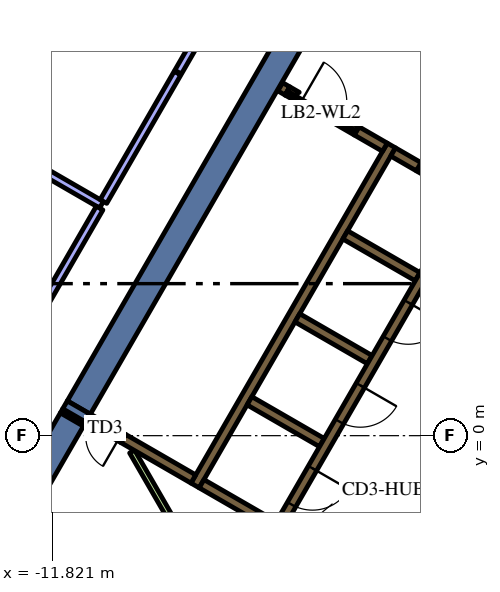
"""IFC4 building model, lengths in metres.
Left out: names, types, materials, properties, quantities, classifications, styles, units other than length and angle.
Written with IfcOpenShell. Run it as: python <this file> out.ifc"""

import sys

from ifc_helpers import new_model, si_unit, direction, frame, frame_2d, origin, place, context, subcontext, project, spatial, polyline, rectangle, outline, extrude, element, fill, save


model = new_model("IFC4")
c1 = context("Model", 3, precision=1e-05, world=origin(), true_north=direction((0.0, 1.0)))
c2 = subcontext(c1, "Body", "Model", "MODEL_VIEW")
j1 = project(units=[si_unit("LENGTHUNIT", "METRE"), si_unit("PLANEANGLEUNIT", "RADIAN")], contexts=[c1])
p1 = place(None, origin())
s1 = spatial("IfcSite", under=j1, at=p1, CompositionType="ELEMENT")
p2 = place(p1, origin())
s2 = spatial("IfcBuilding", under=s1, at=p2, CompositionType="ELEMENT")
p3 = place(p2, frame((0.0, 0.0, 214.2)))
s3 = spatial("IfcBuildingStorey", under=s2, at=p3, CompositionType="ELEMENT", Elevation=214.2)
p4 = place(p3, frame((-11.301, 0.426, 0.0), z_axis=(0.0, 0.0, 1.0), x_axis=(0.50111559984, 0.865380353138, 0.0)))
e1 = element("IfcWall", 1, at=p4, inside=s3, PredefinedType="SOLIDWALL", context=c2, shape_type="SweptSolid", body=[
    extrude(rectangle(XDim=0.121, YDim=0.7, at=frame_2d((0.061, 0.0))), origin(), (0.0, 0.0, 1.0), 4.2),
])
p5 = place(p3, frame((-15.321, -6.537, 0.0), z_axis=(0.0, 0.0, 1.0), x_axis=(0.500000268222, 0.866025248926, 0.0)))
e2 = element("IfcWall", 2, at=p5, inside=s3, PredefinedType="SOLIDWALL", context=c2, shape_type="SweptSolid", body=[
    extrude(rectangle(XDim=8.038, YDim=0.7, at=frame_2d((4.019, 0.0))), origin(), (0.0, 0.0, 1.0), 4.2),
])
p6 = place(p3, frame((-4.696, 11.867, 0.0), z_axis=(0.0, 0.0, 1.0), x_axis=(-0.500003726532, -0.866023252259, 0.0)))
e3 = element("IfcWall", 3, at=p6, inside=s3, PredefinedType="SOLIDWALL", context=c2, shape_type="SweptSolid", body=[
    extrude(rectangle(XDim=12.848, YDim=0.7, at=frame_2d((6.424, 0.0))), origin(), (0.0, 0.0, 1.0), 4.2),
])
p7 = place(p3, origin())
e4 = element("IfcWall", 4, at=p7, inside=s3, PredefinedType="SOLIDWALL", context=c2, shape_type="SweptSolid", body=[
    extrude(outline(polyline([(-11.543, 0.708), (-11.424, 0.914), (-10.843, 0.578), (-10.962, 0.372), (-11.543, 0.708)])), origin(), (0.0, 0.0, 1.0), 4.2),
])
p8 = place(p3, frame((-8.06, -1.311, 0.0), z_axis=(0.0, 0.0, 1.0), x_axis=(0.50000273126, 0.866023826885, 0.0)))
e5 = element("IfcWall", 5, at=p8, inside=s3, PredefinedType="SOLIDWALL", context=c2, shape_type="SweptSolid", body=[
    extrude(rectangle(XDim=10.33, YDim=0.25, at=frame_2d((5.165, 0.0))), origin(), (0.0, 0.0, 1.0), 4.2),
])
p9 = place(p3, frame((-1.819, 6.87, 0.0), z_axis=(0.0, 0.0, 1.0), x_axis=(-0.866294599386, 0.499533449405, 0.0)))
e6 = element("IfcWall", 6, at=p9, inside=s3, PredefinedType="SOLIDWALL", context=c2, shape_type="SweptSolid", body=[
    extrude(rectangle(XDim=0.41, YDim=0.25, at=frame_2d((0.205, 0.0))), origin(), (0.0, 0.0, 1.0), 4.2),
])
p10 = place(p3, frame((-2.849, 7.465, 0.0), z_axis=(0.0, 0.0, 1.0), x_axis=(0.865955664968, -0.500120771724, 0.0)))
e7 = element("IfcWall", 7, at=p10, inside=s3, PredefinedType="SOLIDWALL", context=c2, shape_type="SweptSolid", body=[
    extrude(rectangle(XDim=0.778, YDim=0.25, at=frame_2d((0.389, 0.0))), origin(), (0.0, 0.0, 1.0), 4.2),
])
for number, where, z_axis, x_axis in (
    (8, (-2.204, 4.182, 0.0), (0.0, 0.0, 1.0), (-0.866, 0.5, 0.0)),
    (9, (-5.369, 3.1, 0.0), (0.0, 0.0, 1.0), (0.866, -0.5, 0.0)),
    (10, (-4.724, -0.182, 0.0), (0.0, 0.0, 1.0), (-0.866, 0.5, 0.0)),
):
    element("IfcWall", number, at=place(p3, frame(where, z_axis=z_axis, x_axis=x_axis)), inside=s3, PredefinedType="SOLIDWALL", context=c2, shape_type="SweptSolid", body=[
        extrude(rectangle(XDim=2.2, YDim=0.25, at=frame_2d((1.1, 0.0))), origin(), (0.0, 0.0, 1.0), 4.2),
    ])
p11 = place(p3, frame((-7.889, -1.265, 0.0), z_axis=(0.0, 0.0, 1.0), x_axis=(0.866057815567, -0.499943856944, 0.0)))
e11 = element("IfcWall", 11, at=p11, inside=s3, PredefinedType="SOLIDWALL", context=c2, shape_type="SweptSolid", body=[
    extrude(rectangle(XDim=2.45, YDim=0.25, at=frame_2d((1.225, 0.0))), origin(), (0.0, 0.0, 1.0), 4.2),
])
p12 = place(p3, frame((-9.95, -0.075, 0.0), z_axis=(0.0, 0.0, 1.0), x_axis=(0.865962177421, -0.500109495288, 0.0)))
e12 = element("IfcWall", 12, at=p12, inside=s3, PredefinedType="SOLIDWALL", context=c2, shape_type="SweptSolid", body=[
    extrude(rectangle(XDim=2.129, YDim=0.25, at=frame_2d((1.065, 0.0))), origin(), (0.0, 0.0, 1.0), 4.2),
])
p13 = place(p3, frame((-5.629, 9.07, 0.0), z_axis=(0.0, 0.0, 1.0), x_axis=(-0.866185586049, 0.49972245349, 0.0)))
e13 = element("IfcWall", 13, at=p13, inside=s3, PredefinedType="SOLIDWALL", context=c2, shape_type="SweptSolid", body=[
    extrude(rectangle(XDim=0.22, YDim=0.25, at=frame_2d((0.11, 0.0))), origin(), (0.0, 0.0, 1.0), 4.2),
])
p14 = place(p3, frame((-3.809, 8.019, 0.0), z_axis=(0.0, 0.0, 1.0), x_axis=(0.866010229787, -0.500026281214, 0.0)))
e14 = element("IfcWall", 14, at=p14, inside=s3, PredefinedType="SOLIDWALL", context=c2, shape_type="SweptSolid", body=[
    extrude(rectangle(XDim=0.858, YDim=0.25, at=frame_2d((0.429, 0.0))), origin(), (0.0, 0.0, 1.0), 4.2),
])
e15 = element("IfcWall", 15, at=p7, inside=s3, PredefinedType="SOLIDWALL", context=c2, shape_type="SweptSolid", body=[
    extrude(outline(polyline([(-3.748, 8.128), (-3.813, 8.015), (-4.027, 8.139), (-4.017, 8.156), (-4.008, 8.173), (-4.0, 8.192), (-3.995, 8.21), (-3.991, 8.23), (-3.99, 8.25), (-3.99, 8.268), (-3.748, 8.128)])), origin(), (0.0, 0.0, 1.0), 4.2),
])
e16 = element("IfcWall", 16, at=p7, inside=s3, PredefinedType="SOLIDWALL", context=c2, shape_type="SweptSolid", body=[
    extrude(outline(polyline([(-5.689, 8.96), (-5.69, 8.961), (-5.565, 9.177), (-5.319, 9.035), (-5.335, 9.026), (-5.351, 9.015), (-5.366, 9.002), (-5.379, 8.988), (-5.392, 8.972), (-5.402, 8.956), (-5.412, 8.939), (-5.629, 9.064), (-5.629, 9.064), (-5.689, 8.96)])), origin(), (0.0, 0.0, 1.0), 4.2),
])
p15 = place(p3, frame((-9.718, -0.417, 0.0), z_axis=(0.0, 0.0, 1.0), x_axis=(0.499966538646, -0.866044721844, 0.0)))
e17 = element("IfcWall", 17, at=p15, inside=s3, PredefinedType="PARTITIONING", context=c2, shape_type="SweptSolid", body=[
    extrude(rectangle(XDim=2.511, YDim=0.15, at=frame_2d((1.255, 0.0))), origin(), (0.0, 0.0, 1.0), 3.45),
])
p16 = place(p3, frame((-6.653, -2.477, 0.0), z_axis=(0.0, 0.0, 1.0), x_axis=(-0.500002592159, 0.866023907196, 0.0)))
e18 = element("IfcWall", 18, at=p16, inside=s3, PredefinedType="PARTITIONING", context=c2, shape_type="SweptSolid", body=[
    extrude(rectangle(XDim=0.503, YDim=0.15, at=frame_2d((0.251, 0.0))), origin(), (0.0, 0.0, 1.0), 3.45),
])
p17 = place(p3, frame((-0.898, 6.194, 0.0), z_axis=(0.0, 0.0, 1.0), x_axis=(-0.499996202215, -0.866027596426, 0.0)))
e19 = element("IfcWall", 19, at=p17, inside=s3, PredefinedType="SOLIDWALL", context=c2, shape_type="SweptSolid", body=[
    extrude(rectangle(XDim=9.83, YDim=0.25, at=frame_2d((4.915, 0.0))), origin(), (0.0, 0.0, 1.0), 4.2),
])
p18 = place(p17, frame((0.585, 0.0, 0.0)))
e20 = element("IfcOpeningElement", 20, at=p18, cuts=e19, PredefinedType="OPENING", context=c2, shape_type="SweptSolid", body=[
    extrude(rectangle(XDim=1.1, YDim=2.1, at=frame_2d((0.55, 1.05))), frame((0.0, 0.135, 0.0), z_axis=(0.0, -1.0, 0.0), x_axis=(1.0, 0.0, 0.0)), (0.0, 0.0, 1.0), 0.27),
])
p19 = place(p17, frame((3.105, 0.0, 0.0)))
e21 = element("IfcOpeningElement", 21, at=p19, cuts=e19, PredefinedType="OPENING", context=c2, shape_type="SweptSolid", body=[
    extrude(rectangle(XDim=1.1, YDim=2.1, at=frame_2d((0.55, 1.05))), frame((0.0, 0.135, 0.0), z_axis=(0.0, -1.0, 0.0), x_axis=(1.0, 0.0, 0.0)), (0.0, 0.0, 1.0), 0.27),
])
p20 = place(p17, frame((5.625, 0.0, 0.0)))
e22 = element("IfcOpeningElement", 22, at=p20, cuts=e19, PredefinedType="OPENING", context=c2, shape_type="SweptSolid", body=[
    extrude(rectangle(XDim=1.1, YDim=2.1, at=frame_2d((0.55, 1.05))), frame((0.0, 0.135, 0.0), z_axis=(0.0, -1.0, 0.0), x_axis=(1.0, 0.0, 0.0)), (0.0, 0.0, 1.0), 0.27),
])
p21 = place(p17, frame((8.145, 0.0, 0.0)))
e23 = element("IfcOpeningElement", 23, at=p21, cuts=e19, PredefinedType="OPENING", context=c2, shape_type="SweptSolid", body=[
    extrude(rectangle(XDim=1.1, YDim=2.1, at=frame_2d((0.55, 1.05))), frame((0.0, 0.135, 0.0), z_axis=(0.0, -1.0, 0.0), x_axis=(1.0, 0.0, 0.0)), (0.0, 0.0, 1.0), 0.27),
])
p22 = place(p3, frame((-5.659, 9.012, 0.0), z_axis=(0.0, 0.0, 1.0), x_axis=(0.866009402589, -0.500027713859, 0.0)))
e24 = element("IfcWall", 24, at=p22, inside=s3, PredefinedType="PARTITIONING", context=c2, shape_type="SweptSolid", body=[
    extrude(rectangle(XDim=2.1, YDim=0.12, at=frame_2d((1.05, 0.0))), origin(), (0.0, 0.0, 1.0), 3.45),
])
p23 = place(p22, frame((0.45, 0.0, 0.0)))
e25 = element("IfcOpeningElement", 25, at=p23, cuts=e24, PredefinedType="OPENING", context=c2, shape_type="SweptSolid", body=[
    extrude(rectangle(XDim=1.2, YDim=2.1, at=frame_2d((0.6, 1.05))), frame((0.0, 0.07, 0.0), z_axis=(0.0, -1.0, 0.0), x_axis=(1.0, 0.0, 0.0)), (0.0, 0.0, 1.0), 0.14),
])
p24 = place(p3, frame((-9.95, -0.075, 0.0), z_axis=(0.0, 0.0, 1.0), x_axis=(-0.865952669392, 0.500125958508, 0.0)))
e26 = element("IfcWall", 26, at=p24, inside=s3, PredefinedType="SOLIDWALL", context=c2, shape_type="SweptSolid", body=[
    extrude(rectangle(XDim=1.1, YDim=0.25, at=frame_2d((0.55, 0.0))), origin(), (0.0, 0.0, 1.0), 4.2),
])
p25 = place(p24, frame((0.1, 0.0, 0.0)))
e27 = element("IfcOpeningElement", 27, at=p25, cuts=e26, PredefinedType="OPENING", context=c2, shape_type="SweptSolid", body=[
    extrude(rectangle(XDim=0.9, YDim=2.1, at=frame_2d((0.45, 1.05))), frame((0.0, 0.135, 0.0), z_axis=(0.0, -1.0, 0.0), x_axis=(1.0, 0.0, 0.0)), (0.0, 0.0, 1.0), 0.27),
])
p26 = place(p3, frame((-10.522, 6.075, 0.0), z_axis=(0.0, 0.0, 1.0), x_axis=(-0.866002601515, 0.500039492609, 0.0)))
e28 = element("IfcWall", 28, at=p26, inside=s3, PredefinedType="PARTITIONING", context=c2, shape_type="SweptSolid", body=[
    extrude(rectangle(XDim=3.844, YDim=0.2, at=frame_2d((1.922, 0.0))), origin(), (0.0, 0.0, 1.0), 3.45),
])
p27 = place(p3, frame((-8.522, 9.539, 0.0), z_axis=(0.0, 0.0, 1.0), x_axis=(-0.499997012787, -0.866027128446, 0.0)))
e29 = element("IfcWall", 29, at=p27, inside=s3, PredefinedType="PARTITIONING", context=c2, shape_type="SweptSolid", body=[
    extrude(rectangle(XDim=3.9, YDim=0.2, at=frame_2d((1.95, 0.0))), origin(), (0.0, 0.0, 1.0), 3.45),
])
p28 = place(p3, frame((-5.75, 14.341, 0.0), z_axis=(0.0, 0.0, 1.0), x_axis=(-0.499995817524, -0.866027818524, 0.0)))
e30 = element("IfcWall", 30, at=p28, inside=s3, PredefinedType="PARTITIONING", context=c2, shape_type="SweptSolid", body=[
    extrude(rectangle(XDim=5.515, YDim=0.2, at=frame_2d((2.757, 0.0))), origin(), (0.0, 0.0, 1.0), 3.45),
])
p29 = place(p3, frame((-10.572, 5.988, 0.0), z_axis=(0.0, 0.0, 1.0), x_axis=(-0.499997012787, -0.866027128446, 0.0)))
e31 = element("IfcWall", 31, at=p29, inside=s3, PredefinedType="PARTITIONING", context=c2, shape_type="SweptSolid", body=[
    extrude(rectangle(XDim=3.9, YDim=0.2, at=frame_2d((1.95, 0.0))), origin(), (0.0, 0.0, 1.0), 3.45),
])
p30 = place(p19, origin())
e32 = element("IfcDoor", 32, at=p30, inside=s3, OperationType="DOUBLE_DOOR_SLIDING", PredefinedType="DOOR", context=c2, shape_type="SweptSolid", body=[
    extrude(rectangle(XDim=1.1, YDim=2.1, at=frame_2d((0.55, 1.05))), frame((0.0, 0.025, 0.0), z_axis=(0.0, -1.0, 0.0), x_axis=(1.0, 0.0, 0.0)), (0.0, 0.0, 1.0), 0.05),
])
fill(e21, e32)
p31 = place(p20, origin())
e33 = element("IfcDoor", 33, at=p31, inside=s3, OperationType="DOUBLE_DOOR_SLIDING", PredefinedType="DOOR", context=c2, shape_type="SweptSolid", body=[
    extrude(rectangle(XDim=1.1, YDim=2.1, at=frame_2d((0.55, 1.05))), frame((0.0, 0.025, 0.0), z_axis=(0.0, -1.0, 0.0), x_axis=(1.0, 0.0, 0.0)), (0.0, 0.0, 1.0), 0.05),
])
fill(e22, e33)
p32 = place(p21, origin())
e34 = element("IfcDoor", 34, at=p32, inside=s3, OperationType="DOUBLE_DOOR_SLIDING", PredefinedType="DOOR", context=c2, shape_type="SweptSolid", body=[
    extrude(rectangle(XDim=1.1, YDim=2.1, at=frame_2d((0.55, 1.05))), frame((0.0, 0.025, 0.0), z_axis=(0.0, -1.0, 0.0), x_axis=(1.0, 0.0, 0.0)), (0.0, 0.0, 1.0), 0.05),
])
fill(e23, e34)
p33 = place(p23, origin())
e35 = element("IfcDoor", 35, at=p33, inside=s3, OperationType="SINGLE_SWING_LEFT", PredefinedType="DOOR", context=c2, shape_type="SweptSolid", body=[
    extrude(rectangle(XDim=1.2, YDim=2.1, at=frame_2d((0.6, 1.05))), frame((0.0, 0.025, 0.0), z_axis=(0.0, -1.0, 0.0), x_axis=(1.0, 0.0, 0.0)), (0.0, 0.0, 1.0), 0.05),
])
fill(e25, e35)
p34 = place(p25, origin())
e36 = element("IfcDoor", 36, at=p34, inside=s3, OperationType="SINGLE_SWING_LEFT", PredefinedType="DOOR", context=c2, shape_type="SweptSolid", body=[
    extrude(rectangle(XDim=0.9, YDim=2.1, at=frame_2d((0.45, 1.05))), frame((0.0, 0.025, 0.0), z_axis=(0.0, -1.0, 0.0), x_axis=(1.0, 0.0, 0.0)), (0.0, 0.0, 1.0), 0.05),
])
fill(e27, e36)
save(model, sys.argv[1])
